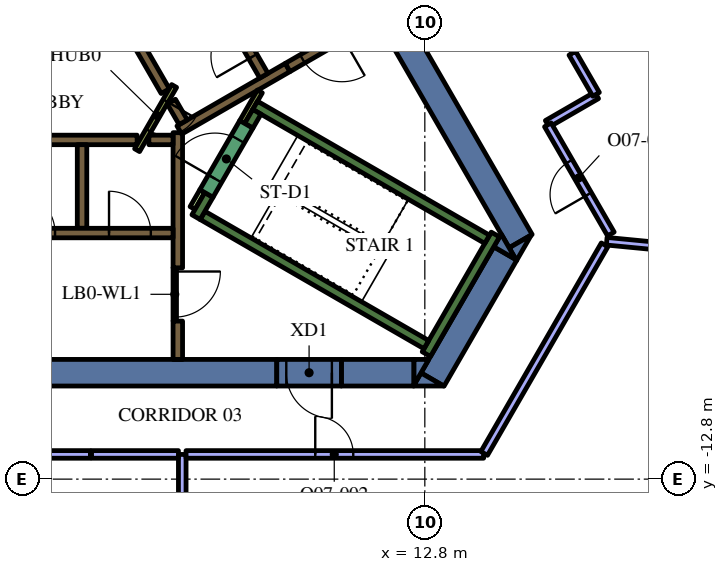
"""IFC4 building model, lengths in metres.
Left out: names, types, materials, properties, quantities, classifications, styles, units other than length and angle.
Written with IfcOpenShell. Run it as: python <this file> out.ifc"""

import sys

from ifc_helpers import new_model, si_unit, direction, frame, frame_2d, origin, place, context, subcontext, project, spatial, polyline, rectangle, outline, extrude, element, fill, save


model = new_model("IFC4")
c1 = context("Model", 3, precision=1e-05, world=origin(), true_north=direction((0.0, 1.0)))
c2 = subcontext(c1, "Body", "Model", "MODEL_VIEW")
j1 = project(units=[si_unit("LENGTHUNIT", "METRE"), si_unit("PLANEANGLEUNIT", "RADIAN")], contexts=[c1])
p1 = place(None, origin())
s1 = spatial("IfcSite", under=j1, at=p1, CompositionType="ELEMENT")
p2 = place(p1, origin())
s2 = spatial("IfcBuilding", under=s1, at=p2, CompositionType="ELEMENT")
p3 = place(p2, frame((0.0, 0.0, 222.6)))
s3 = spatial("IfcBuildingStorey", under=s2, at=p3, CompositionType="ELEMENT", Elevation=222.6)
p4 = place(p3, frame((9.085, 4.264, 0.0), z_axis=(0.0, 0.0, 1.0), x_axis=(0.499998082512, -0.866026510844, 0.0)))
e1 = element("IfcWall", 1, at=p4, inside=s3, PredefinedType="SOLIDWALL", context=c2, shape_type="SweptSolid", body=[
    extrude(rectangle(XDim=12.472, YDim=0.7, at=frame_2d((6.236, 0.0))), origin(), (0.0, 0.0, 1.0), 4.2),
])
p5 = place(p3, origin())
e2 = element("IfcWall", 2, at=p5, inside=s3, PredefinedType="SOLIDWALL", context=c2, shape_type="SweptSolid", body=[
    extrude(outline(polyline([(15.213, -7.05), (15.019, -6.714), (15.601, -6.378), (15.213, -7.05)])), origin(), (0.0, 0.0, 1.0), 4.2),
])
p6 = place(p3, frame((13.003, -10.179, 0.0), z_axis=(0.0, 0.0, 1.0), x_axis=(0.499972675833, 0.866041178825, 0.0)))
e3 = element("IfcWall", 3, at=p6, inside=s3, PredefinedType="SOLIDWALL", context=c2, shape_type="SweptSolid", body=[
    extrude(rectangle(XDim=3.829, YDim=0.7, at=frame_2d((1.915, 0.0))), origin(), (0.0, 0.0, 1.0), 4.2),
])
e4 = element("IfcWall", 4, at=p5, inside=s3, PredefinedType="SOLIDWALL", context=c2, shape_type="SweptSolid", body=[
    extrude(outline(polyline([(12.698, -10.005), (13.296, -10.35), (12.5, -10.35), (12.698, -10.005)])), origin(), (0.0, 0.0, 1.0), 4.2),
])
e5 = element("IfcWall", 5, at=p5, inside=s3, PredefinedType="SOLIDWALL", context=c2, shape_type="SweptSolid", body=[
    extrude(outline(polyline([(14.809, -6.35), (15.197, -7.022), (14.615, -6.686), (14.809, -6.35)])), origin(), (0.0, 0.0, 1.0), 4.2),
])
p7 = place(p3, frame((10.604, -10.0, 0.0), z_axis=(0.0, 0.0, 1.0), x_axis=(1.0, 0.0, 0.0)))
e6 = element("IfcWall", 6, at=p7, inside=s3, PredefinedType="SOLIDWALL", context=c2, shape_type="SweptSolid", body=[
    extrude(rectangle(XDim=1.909, YDim=0.7, at=frame_2d((0.955, 0.0))), origin(), (0.0, 0.0, 1.0), 4.2),
])
e7 = element("IfcWall", 7, at=p5, inside=s3, PredefinedType="SOLIDWALL", context=c2, shape_type="SweptSolid", body=[
    extrude(outline(polyline([(12.904, -9.65), (12.516, -10.322), (12.516, -9.65), (12.904, -9.65)])), origin(), (0.0, 0.0, 1.0), 4.2),
])
p8 = place(p3, frame((8.904, -10.0, 0.0), z_axis=(0.0, 0.0, 1.0), x_axis=(-1.0, 0.0, 0.0)))
e8 = element("IfcWall", 8, at=p8, inside=s3, PredefinedType="SOLIDWALL", context=c2, shape_type="SweptSolid", body=[
    extrude(rectangle(XDim=22.226, YDim=0.7, at=frame_2d((11.113, 0.0))), origin(), (0.0, 0.0, 1.0), 4.2),
])
p9 = place(p3, frame((12.84, -9.511, 0.0), z_axis=(0.0, 0.0, 1.0), x_axis=(0.500048121057, 0.865997619297, 0.0)))
e9 = element("IfcWall", 9, at=p9, inside=s3, PredefinedType="SOLIDWALL", context=c2, shape_type="SweptSolid", body=[
    extrude(rectangle(XDim=3.634, YDim=0.25, at=frame_2d((1.817, 0.0))), origin(), (0.0, 0.0, 1.0), 4.2),
])
p10 = place(p3, frame((12.84, -9.261, 0.0), z_axis=(0.0, 0.0, 1.0), x_axis=(-0.866013990052, 0.500019768644, 0.0)))
e10 = element("IfcWall", 10, at=p10, inside=s3, PredefinedType="SOLIDWALL", context=c2, shape_type="SweptSolid", body=[
    extrude(rectangle(XDim=6.8, YDim=0.25, at=frame_2d((3.4, 0.0))), origin(), (0.0, 0.0, 1.0), 4.2),
])
p11 = place(p3, frame((6.78, -5.906, 0.0), z_axis=(0.0, 0.0, 1.0), x_axis=(0.500223362819, 0.865896406789, 0.0)))
e11 = element("IfcWall", 11, at=p11, inside=s3, PredefinedType="SOLIDWALL", context=c2, shape_type="SweptSolid", body=[
    extrude(rectangle(XDim=0.675, YDim=0.25, at=frame_2d((0.337, 0.0))), origin(), (0.0, 0.0, 1.0), 4.2),
])
p12 = place(p3, frame((8.334, -2.964, 0.0), z_axis=(0.0, 0.0, 1.0), x_axis=(0.866016039709, -0.500016218704, 0.0)))
e12 = element("IfcWall", 12, at=p12, inside=s3, PredefinedType="SOLIDWALL", context=c2, shape_type="SweptSolid", body=[
    extrude(rectangle(XDim=7.05, YDim=0.25, at=frame_2d((3.525, 0.0))), origin(), (0.0, 0.0, 1.0), 4.2),
])
p13 = place(p3, frame((8.168, -3.503, 0.0), z_axis=(0.0, 0.0, 1.0), x_axis=(0.49972245349, 0.866185586049, 0.0)))
e13 = element("IfcWall", 13, at=p13, inside=s3, PredefinedType="SOLIDWALL", context=c2, shape_type="SweptSolid", body=[
    extrude(rectangle(XDim=0.425, YDim=0.25, at=frame_2d((0.212, 0.0))), origin(), (0.0, 0.0, 1.0), 4.2),
])
p14 = place(p3, frame((-5.259, -3.875, 0.0), z_axis=(0.0, 0.0, 1.0), x_axis=(1.0, 0.0, 0.0)))
e14 = element("IfcWall", 14, at=p14, inside=s3, PredefinedType="SOLIDWALL", context=c2, shape_type="SweptSolid", body=[
    extrude(rectangle(XDim=10.489, YDim=0.25, at=frame_2d((5.244, 0.0))), origin(), (0.0, 0.0, 1.0), 4.2),
])
p15 = place(p3, frame((3.78, -4.0, 0.0), z_axis=(0.0, 0.0, 1.0), x_axis=(0.0, -1.0, 0.0)))
e15 = element("IfcWall", 15, at=p15, inside=s3, PredefinedType="SOLIDWALL", context=c2, shape_type="SweptSolid", body=[
    extrude(rectangle(XDim=2.2, YDim=0.25, at=frame_2d((1.1, 0.0))), origin(), (0.0, 0.0, 1.0), 4.2),
])
p16 = place(p3, frame((6.3, -7.24, 0.0), z_axis=(0.0, 0.0, 1.0), x_axis=(0.0, 1.0, 0.0)))
e16 = element("IfcWall", 16, at=p16, inside=s3, PredefinedType="SOLIDWALL", context=c2, shape_type="SweptSolid", body=[
    extrude(rectangle(XDim=3.556, YDim=0.25, at=frame_2d((1.778, 0.0))), origin(), (0.0, 0.0, 1.0), 4.2),
])
p17 = place(p3, frame((6.3, -9.65, 0.0), z_axis=(0.0, 0.0, 1.0), x_axis=(0.0, 1.0, 0.0)))
e17 = element("IfcWall", 17, at=p17, inside=s3, PredefinedType="SOLIDWALL", context=c2, shape_type="SweptSolid", body=[
    extrude(rectangle(XDim=1.008, YDim=0.25, at=frame_2d((0.504, 0.0))), origin(), (0.0, 0.0, 1.0), 4.2),
])
p18 = place(p3, frame((5.538, -3.875, 0.0), z_axis=(0.0, 0.0, 1.0), x_axis=(1.0, 0.0, 0.0)))
e18 = element("IfcWall", 18, at=p18, inside=s3, PredefinedType="SOLIDWALL", context=c2, shape_type="SweptSolid", body=[
    extrude(rectangle(XDim=0.637, YDim=0.25, at=frame_2d((0.318, 0.0))), origin(), (0.0, 0.0, 1.0), 4.2),
])
p19 = place(p3, frame((9.19, -1.969, 0.0), z_axis=(0.0, 0.0, 1.0), x_axis=(-0.866057109641, -0.499945079824, 0.0)))
e19 = element("IfcWall", 19, at=p19, inside=s3, PredefinedType="SOLIDWALL", context=c2, shape_type="SweptSolid", body=[
    extrude(rectangle(XDim=3.291, YDim=0.25, at=frame_2d((1.646, 0.0))), origin(), (0.0, 0.0, 1.0), 4.2),
])
p20 = place(p3, frame((6.13, -2.867, 0.0), z_axis=(0.0, 0.0, 1.0), x_axis=(0.500160776593, -0.865932559475, 0.0)))
e20 = element("IfcWall", 20, at=p20, inside=s3, PredefinedType="SOLIDWALL", context=c2, shape_type="SweptSolid", body=[
    extrude(rectangle(XDim=0.627, YDim=0.25, at=frame_2d((0.313, 0.0))), origin(), (0.0, 0.0, 1.0), 4.2),
])
p21 = place(p3, frame((5.97, -2.591, 0.0), z_axis=(0.0, 0.0, 1.0), x_axis=(-0.499994469932, 0.866028596547, 0.0)))
e21 = element("IfcWall", 21, at=p21, inside=s3, PredefinedType="SOLIDWALL", context=c2, shape_type="SweptSolid", body=[
    extrude(rectangle(XDim=10.488, YDim=0.25, at=frame_2d((5.244, 0.0))), origin(), (0.0, 0.0, 1.0), 4.2),
])
p22 = place(p3, frame((6.945, -5.222, 0.0), z_axis=(0.0, 0.0, 1.0), x_axis=(-0.499818422106, -0.866130212453, 0.0)))
e22 = element("IfcWall", 22, at=p22, inside=s3, PredefinedType="PARTITIONING", context=c2, shape_type="SweptSolid", body=[
    extrude(rectangle(XDim=0.514, YDim=0.15, at=frame_2d((0.257, 0.0))), origin(), (0.0, 0.0, 1.0), 3.45),
])
p23 = place(p3, frame((8.459, -2.599, 0.0), z_axis=(0.0, 0.0, 1.0), x_axis=(-0.500041054325, -0.866001699761, 0.0)))
e23 = element("IfcWall", 23, at=p23, inside=s3, PredefinedType="PARTITIONING", context=c2, shape_type="SweptSolid", body=[
    extrude(rectangle(XDim=0.929, YDim=0.15, at=frame_2d((0.464, 0.0))), origin(), (0.0, 0.0, 1.0), 4.2),
])
p24 = place(p3, frame((-6.175, -6.325, 0.0), z_axis=(0.0, 0.0, 1.0), x_axis=(1.0, 0.0, 0.0)))
e24 = element("IfcWall", 24, at=p24, inside=s3, PredefinedType="SOLIDWALL", context=c2, shape_type="SweptSolid", body=[
    extrude(rectangle(XDim=12.35, YDim=0.25, at=frame_2d((6.175, 0.0))), origin(), (0.0, 0.0, 1.0), 4.2),
])
p25 = place(p24, frame((0.585, 0.0, 0.0)))
e25 = element("IfcOpeningElement", 25, at=p25, cuts=e24, PredefinedType="OPENING", context=c2, shape_type="SweptSolid", body=[
    extrude(rectangle(XDim=1.1, YDim=2.1, at=frame_2d((0.55, 1.05))), frame((0.0, 0.135, 0.0), z_axis=(0.0, -1.0, 0.0), x_axis=(1.0, 0.0, 0.0)), (0.0, 0.0, 1.0), 0.27),
])
p26 = place(p24, frame((3.105, 0.0, 0.0)))
e26 = element("IfcOpeningElement", 26, at=p26, cuts=e24, PredefinedType="OPENING", context=c2, shape_type="SweptSolid", body=[
    extrude(rectangle(XDim=1.1, YDim=2.1, at=frame_2d((0.55, 1.05))), frame((0.0, 0.135, 0.0), z_axis=(0.0, -1.0, 0.0), x_axis=(1.0, 0.0, 0.0)), (0.0, 0.0, 1.0), 0.27),
])
p27 = place(p24, frame((5.625, 0.0, 0.0)))
e27 = element("IfcOpeningElement", 27, at=p27, cuts=e24, PredefinedType="OPENING", context=c2, shape_type="SweptSolid", body=[
    extrude(rectangle(XDim=1.1, YDim=2.1, at=frame_2d((0.55, 1.05))), frame((0.0, 0.135, 0.0), z_axis=(0.0, -1.0, 0.0), x_axis=(1.0, 0.0, 0.0)), (0.0, 0.0, 1.0), 0.27),
])
p28 = place(p24, frame((8.145, 0.0, 0.0)))
e28 = element("IfcOpeningElement", 28, at=p28, cuts=e24, PredefinedType="OPENING", context=c2, shape_type="SweptSolid", body=[
    extrude(rectangle(XDim=1.1, YDim=2.1, at=frame_2d((0.55, 1.05))), frame((0.0, 0.135, 0.0), z_axis=(0.0, -1.0, 0.0), x_axis=(1.0, 0.0, 0.0)), (0.0, 0.0, 1.0), 0.27),
])
p29 = place(p24, frame((10.665, 0.0, 0.0)))
e29 = element("IfcOpeningElement", 29, at=p29, cuts=e24, PredefinedType="OPENING", context=c2, shape_type="SweptSolid", body=[
    extrude(rectangle(XDim=1.1, YDim=2.1, at=frame_2d((0.55, 1.05))), frame((0.0, 0.135, 0.0), z_axis=(0.0, -1.0, 0.0), x_axis=(1.0, 0.0, 0.0)), (0.0, 0.0, 1.0), 0.27),
])
p30 = place(p3, frame((8.565, -2.185, 0.0), z_axis=(0.0, 0.0, 1.0), x_axis=(-0.499997954832, 0.866026584559, 0.0)))
e30 = element("IfcWall", 30, at=p30, inside=s3, PredefinedType="SOLIDWALL", context=c2, shape_type="SweptSolid", body=[
    extrude(rectangle(XDim=12.35, YDim=0.25, at=frame_2d((6.175, 0.0))), origin(), (0.0, 0.0, 1.0), 4.2),
])
p31 = place(p30, frame((0.585, 0.0, 0.0)))
e31 = element("IfcOpeningElement", 31, at=p31, cuts=e30, PredefinedType="OPENING", context=c2, shape_type="SweptSolid", body=[
    extrude(rectangle(XDim=1.1, YDim=2.1, at=frame_2d((0.55, 1.05))), frame((0.0, 0.135, 0.0), z_axis=(0.0, -1.0, 0.0), x_axis=(1.0, 0.0, 0.0)), (0.0, 0.0, 1.0), 0.27),
])
p32 = place(p3, frame((7.053, -5.284, 0.0), z_axis=(0.0, 0.0, 1.0), x_axis=(0.500078061341, 0.865980330357, 0.0)))
e32 = element("IfcWall", 32, at=p32, inside=s3, PredefinedType="SOLIDWALL", context=c2, shape_type="SweptSolid", body=[
    extrude(rectangle(XDim=2.1, YDim=0.4, at=frame_2d((1.05, 0.0))), origin(), (0.0, 0.0, 1.0), 4.2),
])
p33 = place(p32, frame((0.45, 0.0, 0.0)))
e33 = element("IfcOpeningElement", 33, at=p33, cuts=e32, PredefinedType="OPENING", context=c2, shape_type="SweptSolid", body=[
    extrude(rectangle(XDim=1.2, YDim=2.1, at=frame_2d((0.6, 1.05))), frame((0.0, 0.21, 0.0), z_axis=(0.0, -1.0, 0.0), x_axis=(1.0, 0.0, 0.0)), (0.0, 0.0, 1.0), 0.42),
])
p34 = place(p3, frame((6.203, -2.456, 0.0), z_axis=(0.0, 0.0, 1.0), x_axis=(-0.500043961785, -0.866000020948, 0.0)))
e34 = element("IfcWall", 34, at=p34, inside=s3, PredefinedType="PARTITIONING", context=c2, shape_type="SweptSolid", body=[
    extrude(rectangle(XDim=1.95, YDim=0.15, at=frame_2d((0.975, 0.0))), origin(), (0.0, 0.0, 1.0), 4.2),
])
p35 = place(p34, frame((0.45, 0.0, 0.0)))
e35 = element("IfcOpeningElement", 35, at=p35, cuts=e34, PredefinedType="OPENING", context=c2, shape_type="SweptSolid", body=[
    extrude(rectangle(XDim=0.9, YDim=2.1, at=frame_2d((0.45, 1.05))), frame((0.0, 0.085, 0.0), z_axis=(0.0, -1.0, 0.0), x_axis=(1.0, 0.0, 0.0)), (0.0, 0.0, 1.0), 0.17),
])
p36 = place(p3, frame((6.22, -7.237, 0.0), z_axis=(0.0, 0.0, 1.0), x_axis=(0.0, -1.0, 0.0)))
e36 = element("IfcWall", 36, at=p36, inside=s3, PredefinedType="PARTITIONING", context=c2, shape_type="SweptSolid", body=[
    extrude(rectangle(XDim=1.4, YDim=0.09, at=frame_2d((0.7, 0.0))), origin(), (0.0, 0.0, 1.0), 3.45),
])
p37 = place(p36, frame((0.1, 0.0, 0.0)))
e37 = element("IfcOpeningElement", 37, at=p37, cuts=e36, PredefinedType="OPENING", context=c2, shape_type="SweptSolid", body=[
    extrude(rectangle(XDim=1.2, YDim=2.1, at=frame_2d((0.6, 1.05))), frame((0.0, 0.055, 0.0), z_axis=(0.0, -1.0, 0.0), x_axis=(1.0, 0.0, 0.0)), (0.0, 0.0, 1.0), 0.11),
])
p38 = place(p3, frame((11.009, -0.919, 0.0), z_axis=(0.0, 0.0, 1.0), x_axis=(-0.866059744384, -0.49994051562, 0.0)))
e38 = element("IfcWall", 38, at=p38, inside=s3, PredefinedType="SOLIDWALL", context=c2, shape_type="SweptSolid", body=[
    extrude(rectangle(XDim=2.1, YDim=0.25, at=frame_2d((1.05, 0.0))), origin(), (0.0, 0.0, 1.0), 4.2),
])
p39 = place(p38, frame((0.45, 0.0, 0.0)))
e39 = element("IfcOpeningElement", 39, at=p39, cuts=e38, PredefinedType="OPENING", context=c2, shape_type="SweptSolid", body=[
    extrude(rectangle(XDim=1.2, YDim=2.1, at=frame_2d((0.6, 1.05))), frame((0.0, 0.135, 0.0), z_axis=(0.0, -1.0, 0.0), x_axis=(1.0, 0.0, 0.0)), (0.0, 0.0, 1.0), 0.27),
])
p40 = place(p3, frame((10.604, -10.0, 0.0), z_axis=(0.0, 0.0, 1.0), x_axis=(-1.0, 0.0, 0.0)))
e40 = element("IfcWall", 40, at=p40, inside=s3, PredefinedType="SOLIDWALL", context=c2, shape_type="SweptSolid", body=[
    extrude(rectangle(XDim=1.7, YDim=0.7, at=frame_2d((0.85, 0.0))), origin(), (0.0, 0.0, 1.0), 4.2),
])
p41 = place(p40, frame((0.25, 0.0, 0.0)))
e41 = element("IfcOpeningElement", 41, at=p41, cuts=e40, PredefinedType="OPENING", context=c2, shape_type="SweptSolid", body=[
    extrude(rectangle(XDim=1.2, YDim=2.1, at=frame_2d((0.6, 1.05))), frame((0.0, 0.36, 0.0), z_axis=(0.0, -1.0, 0.0), x_axis=(1.0, 0.0, 0.0)), (0.0, 0.0, 1.0), 0.72),
])
p42 = place(p3, frame((6.417, -12.15, 0.0), z_axis=(0.0, 0.0, 1.0), x_axis=(0.0, -1.0, 0.0)))
e42 = element("IfcWall", 42, at=p42, inside=s3, PredefinedType="PARTITIONING", context=c2, shape_type="SweptSolid", body=[
    extrude(rectangle(XDim=6.747, YDim=0.2, at=frame_2d((3.374, 0.0))), origin(), (0.0, 0.0, 1.0), 3.45),
])
p43 = place(p3, frame((-3.108, -12.15, 0.0), z_axis=(0.0, 0.0, 1.0), x_axis=(1.0, 0.0, 0.0)))
e43 = element("IfcWall", 43, at=p43, inside=s3, PredefinedType="PARTITIONING", context=c2, shape_type="SweptSolid", body=[
    extrude(rectangle(XDim=7.108, YDim=0.2, at=frame_2d((3.554, 0.0))), origin(), (0.0, 0.0, 1.0), 3.45),
])
p44 = place(p43, frame((3.1, 0.0, 0.0)))
e44 = element("IfcOpeningElement", 44, at=p44, cuts=e43, PredefinedType="OPENING", context=c2, shape_type="SweptSolid", body=[
    extrude(rectangle(XDim=1.0, YDim=2.1, at=frame_2d((0.5, 1.05))), frame((0.0, 0.11, 0.0), z_axis=(0.0, -1.0, 0.0), x_axis=(1.0, 0.0, 0.0)), (0.0, 0.0, 1.0), 0.22),
])
p45 = place(p3, frame((4.03, -12.15, 0.0), z_axis=(0.0, 0.0, 1.0), x_axis=(1.0, 0.0, 0.0)))
e45 = element("IfcWall", 45, at=p45, inside=s3, PredefinedType="PARTITIONING", context=c2, shape_type="SweptSolid", body=[
    extrude(rectangle(XDim=2.287, YDim=0.2, at=frame_2d((1.144, 0.0))), origin(), (0.0, 0.0, 1.0), 3.45),
])
p46 = place(p3, frame((17.586, -6.54, 0.0), z_axis=(0.0, 0.0, 1.0), x_axis=(0.995357542522, -0.096246363795, 0.0)))
e46 = element("IfcWall", 46, at=p46, inside=s3, PredefinedType="PARTITIONING", context=c2, shape_type="SweptSolid", body=[
    extrude(rectangle(XDim=7.318, YDim=0.2, at=frame_2d((3.659, 0.0))), origin(), (0.0, 0.0, 1.0), 3.45),
])
p47 = place(p3, frame((6.517, -12.15, 0.0), z_axis=(0.0, 0.0, 1.0), x_axis=(1.0, 0.0, 0.0)))
e47 = element("IfcWall", 47, at=p47, inside=s3, PredefinedType="PARTITIONING", context=c2, shape_type="SweptSolid", body=[
    extrude(rectangle(XDim=7.83, YDim=0.2, at=frame_2d((3.915, 0.0))), origin(), (0.0, 0.0, 1.0), 3.45),
])
p48 = place(p47, frame((3.4, 0.0, 0.0)))
e48 = element("IfcOpeningElement", 48, at=p48, cuts=e47, PredefinedType="OPENING", context=c2, shape_type="SweptSolid", body=[
    extrude(rectangle(XDim=1.0, YDim=2.1, at=frame_2d((0.5, 1.05))), frame((0.0, 0.11, 0.0), z_axis=(0.0, -1.0, 0.0), x_axis=(1.0, 0.0, 0.0)), (0.0, 0.0, 1.0), 0.22),
])
p49 = place(p3, frame((14.362, -12.124, 0.0), z_axis=(0.0, 0.0, 1.0), x_axis=(0.500017005442, 0.866015585465, 0.0)))
e49 = element("IfcWall", 49, at=p49, inside=s3, PredefinedType="PARTITIONING", context=c2, shape_type="SweptSolid", body=[
    extrude(rectangle(XDim=6.338, YDim=0.2, at=frame_2d((3.169, 0.0))), origin(), (0.0, 0.0, 1.0), 3.45),
])
p50 = place(p3, frame((16.631, -1.506, 0.0), z_axis=(0.0, 0.0, 1.0), x_axis=(0.866045655253, 0.499964921787, 0.0)))
e50 = element("IfcWall", 50, at=p50, inside=s3, PredefinedType="PARTITIONING", context=c2, shape_type="SweptSolid", body=[
    extrude(rectangle(XDim=5.607, YDim=0.2, at=frame_2d((2.804, 0.0))), origin(), (0.0, 0.0, 1.0), 3.45),
])
p51 = place(p3, frame((16.022, -3.451, 0.0), z_axis=(0.0, 0.0, 1.0), x_axis=(0.866031096941, 0.499990139034, 0.0)))
e51 = element("IfcWall", 51, at=p51, inside=s3, PredefinedType="PARTITIONING", context=c2, shape_type="SweptSolid", body=[
    extrude(rectangle(XDim=1.5, YDim=0.2, at=frame_2d((0.75, 0.0))), origin(), (0.0, 0.0, 1.0), 3.45),
])
p52 = place(p3, frame((17.306, -2.675, 0.0), z_axis=(0.0, 0.0, 1.0), x_axis=(-0.499919672301, 0.866071776036, 0.0)))
e52 = element("IfcWall", 52, at=p52, inside=s3, PredefinedType="PARTITIONING", context=c2, shape_type="SweptSolid", body=[
    extrude(rectangle(XDim=1.25, YDim=0.2, at=frame_2d((0.625, 0.0))), origin(), (0.0, 0.0, 1.0), 3.45),
])
p53 = place(p3, frame((17.696, -6.35, 0.0), z_axis=(0.0, 0.0, 1.0), x_axis=(-0.500017629075, 0.866015225394, 0.0)))
e53 = element("IfcWall", 53, at=p53, inside=s3, PredefinedType="PARTITIONING", context=c2, shape_type="SweptSolid", body=[
    extrude(rectangle(XDim=3.317, YDim=0.2, at=frame_2d((1.659, 0.0))), origin(), (0.0, 0.0, 1.0), 3.45),
])
p54 = place(p53, frame((1.2, 0.0, 0.0)))
e54 = element("IfcOpeningElement", 54, at=p54, cuts=e53, PredefinedType="OPENING", context=c2, shape_type="SweptSolid", body=[
    extrude(rectangle(XDim=1.0, YDim=2.1, at=frame_2d((0.5, 1.05))), frame((0.0, 0.11, 0.0), z_axis=(0.0, -1.0, 0.0), x_axis=(1.0, 0.0, 0.0)), (0.0, 0.0, 1.0), 0.22),
])
p55 = place(p28, origin())
e55 = element("IfcDoor", 55, at=p55, inside=s3, OperationType="DOUBLE_DOOR_SLIDING", PredefinedType="DOOR", context=c2, shape_type="SweptSolid", body=[
    extrude(rectangle(XDim=1.1, YDim=2.1, at=frame_2d((0.55, 1.05))), frame((0.0, 0.025, 0.0), z_axis=(0.0, -1.0, 0.0), x_axis=(1.0, 0.0, 0.0)), (0.0, 0.0, 1.0), 0.05),
])
fill(e28, e55)
p56 = place(p29, origin())
e56 = element("IfcDoor", 56, at=p56, inside=s3, OperationType="DOUBLE_DOOR_SLIDING", PredefinedType="DOOR", context=c2, shape_type="SweptSolid", body=[
    extrude(rectangle(XDim=1.1, YDim=2.1, at=frame_2d((0.55, 1.05))), frame((0.0, 0.025, 0.0), z_axis=(0.0, -1.0, 0.0), x_axis=(1.0, 0.0, 0.0)), (0.0, 0.0, 1.0), 0.05),
])
fill(e29, e56)
p57 = place(p31, origin())
e57 = element("IfcDoor", 57, at=p57, inside=s3, OperationType="DOUBLE_DOOR_SLIDING", PredefinedType="DOOR", context=c2, shape_type="SweptSolid", body=[
    extrude(rectangle(XDim=1.1, YDim=2.1, at=frame_2d((0.55, 1.05))), frame((0.0, 0.025, 0.0), z_axis=(0.0, -1.0, 0.0), x_axis=(1.0, 0.0, 0.0)), (0.0, 0.0, 1.0), 0.05),
])
fill(e31, e57)
p58 = place(p33, origin())
e58 = element("IfcDoor", 58, at=p58, inside=s3, OperationType="SINGLE_SWING_LEFT", PredefinedType="DOOR", context=c2, shape_type="SweptSolid", body=[
    extrude(rectangle(XDim=1.2, YDim=2.1, at=frame_2d((0.6, 1.05))), frame((0.0, 0.025, 0.0), z_axis=(0.0, -1.0, 0.0), x_axis=(1.0, 0.0, 0.0)), (0.0, 0.0, 1.0), 0.05),
])
fill(e33, e58)
p59 = place(p35, origin())
e59 = element("IfcDoor", 59, at=p59, inside=s3, OperationType="SINGLE_SWING_LEFT", PredefinedType="DOOR", context=c2, shape_type="SweptSolid", body=[
    extrude(rectangle(XDim=0.9, YDim=2.1, at=frame_2d((0.45, 1.05))), frame((0.0, 0.025, 0.0), z_axis=(0.0, -1.0, 0.0), x_axis=(1.0, 0.0, 0.0)), (0.0, 0.0, 1.0), 0.05),
])
fill(e35, e59)
p60 = place(p37, origin())
e60 = element("IfcDoor", 60, at=p60, inside=s3, OperationType="SINGLE_SWING_LEFT", PredefinedType="DOOR", context=c2, shape_type="SweptSolid", body=[
    extrude(rectangle(XDim=1.2, YDim=2.1, at=frame_2d((0.6, 1.05))), frame((0.0, 0.025, 0.0), z_axis=(0.0, -1.0, 0.0), x_axis=(1.0, 0.0, 0.0)), (0.0, 0.0, 1.0), 0.05),
])
fill(e37, e60)
p61 = place(p39, origin())
e61 = element("IfcDoor", 61, at=p61, inside=s3, OperationType="SINGLE_SWING_LEFT", PredefinedType="DOOR", context=c2, shape_type="SweptSolid", body=[
    extrude(rectangle(XDim=1.2, YDim=2.1, at=frame_2d((0.6, 1.05))), frame((0.0, 0.025, 0.0), z_axis=(0.0, -1.0, 0.0), x_axis=(1.0, 0.0, 0.0)), (0.0, 0.0, 1.0), 0.05),
])
fill(e39, e61)
p62 = place(p41, origin())
e62 = element("IfcDoor", 62, at=p62, inside=s3, OperationType="SINGLE_SWING_LEFT", PredefinedType="DOOR", context=c2, shape_type="SweptSolid", body=[
    extrude(rectangle(XDim=1.2, YDim=2.1, at=frame_2d((0.6, 1.05))), frame((0.0, 0.025, 0.0), z_axis=(0.0, -1.0, 0.0), x_axis=(1.0, 0.0, 0.0)), (0.0, 0.0, 1.0), 0.05),
])
fill(e41, e62)
p63 = place(p48, origin())
e63 = element("IfcDoor", 63, at=p63, inside=s3, OperationType="SINGLE_SWING_LEFT", PredefinedType="DOOR", context=c2, shape_type="SweptSolid", body=[
    extrude(rectangle(XDim=1.0, YDim=2.1, at=frame_2d((0.5, 1.05))), frame((0.0, 0.025, 0.0), z_axis=(0.0, -1.0, 0.0), x_axis=(1.0, 0.0, 0.0)), (0.0, 0.0, 1.0), 0.05),
])
fill(e48, e63)
p64 = place(p54, origin())
e64 = element("IfcDoor", 64, at=p64, inside=s3, OperationType="SINGLE_SWING_RIGHT", PredefinedType="DOOR", context=c2, shape_type="SweptSolid", body=[
    extrude(rectangle(XDim=1.0, YDim=2.1, at=frame_2d((0.5, 1.05))), frame((0.0, 0.025, 0.0), z_axis=(0.0, -1.0, 0.0), x_axis=(1.0, 0.0, 0.0)), (0.0, 0.0, 1.0), 0.05),
])
fill(e54, e64)
save(model, sys.argv[1])
